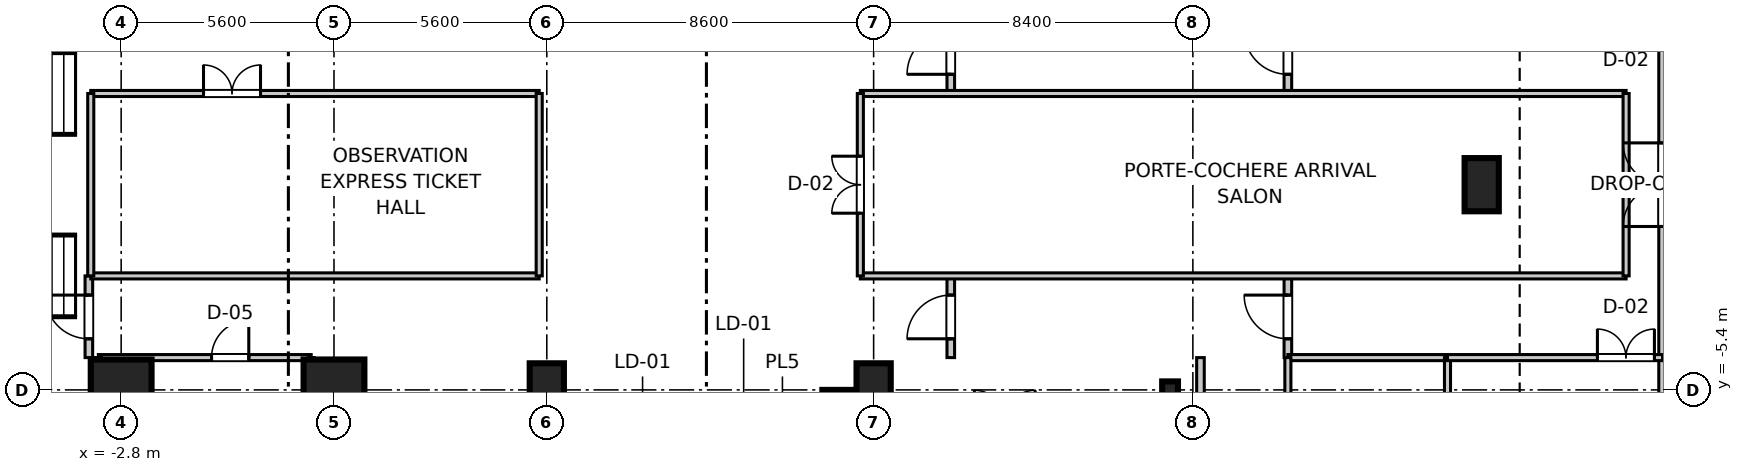
"""IFC4 building model, lengths in metres.
Left out: names, types, materials, properties, quantities, classifications, styles, units other than length and angle.
Written with IfcOpenShell. Run it as: python <this file> out.ifc"""

import sys

from ifc_helpers import new_model, si_unit, direction, frame, frame_2d, origin, origin_2d, place, context, subcontext, project, spatial, rectangle, i_section, extrude, source, transform, mapped, element, fill, save


model = new_model("IFC4")
c1 = context("Model", 3, precision=1e-05, world=origin(), true_north=direction((0.0, 1.0)))
c2 = subcontext(c1, "Body", "Model", "MODEL_VIEW")
j1 = project(units=[si_unit("LENGTHUNIT", "METRE"), si_unit("PLANEANGLEUNIT", "RADIAN")], contexts=[c1])
p1 = place(None, origin())
s1 = spatial("IfcSite", under=j1, at=p1, CompositionType="ELEMENT")
p2 = place(p1, origin())
s2 = spatial("IfcBuilding", under=s1, at=p2, CompositionType="ELEMENT")
p3 = place(p2, origin())
s3 = spatial("IfcBuildingStorey", under=s2, at=p3, CompositionType="ELEMENT", Elevation=0.0)
m1 = source(origin(), c2, "Body", "SweptSolid", [
    extrude(rectangle(XDim=1.6, YDim=1.6, at=origin_2d()), origin(), (0.0, 0.0, 1.0), 5.355),
])
for number, where, z_axis, x_axis in (
    (1, (-2.8, -5.4, 0.0), (0.0, 0.0, 1.0), (1.0, 0.0, 0.0)),
    (2, (2.8, -5.4, 0.0), (0.0, 0.0, 1.0), (1.0, 0.0, 0.0)),
):
    element("IfcColumn", number, at=place(p3, frame(where, z_axis=z_axis, x_axis=x_axis)), inside=s3, PredefinedType="COLUMN", context=c2, shape_type="MappedRepresentation", body=[
        mapped(m1, transform((0.0, 0.0, 0.0), scale=1.0)),
    ])
m2 = source(origin(), c2, "Body", "SweptSolid", [
    extrude(rectangle(XDim=0.9, YDim=1.4, at=origin_2d()), origin(), (0.0, 0.0, 1.0), 5.355),
])
for number, where, z_axis, x_axis in (
    (3, (8.4, -5.4, 0.0), (0.0, 0.0, 1.0), (1.0, 0.0, 0.0)),
    (4, (17.0, -5.4, 0.0), (0.0, 0.0, 1.0), (1.0, 0.0, 0.0)),
    (5, (33.0, 0.0, 0.0), (0.0, 0.0, 1.0), (1.0, 0.0, 0.0)),
):
    element("IfcColumn", number, at=place(p3, frame(where, z_axis=z_axis, x_axis=x_axis)), inside=s3, PredefinedType="PILASTER", context=c2, shape_type="MappedRepresentation", body=[
        mapped(m2, transform((0.0, 0.0, 0.0), scale=1.0)),
    ])
m3 = source(origin(), c2, "Body", "SweptSolid", [
    extrude(i_section(OverallWidth=0.416, OverallDepth=0.446, WebThickness=0.025, FlangeThickness=0.04, at=origin_2d()), origin(), (0.0, 0.0, 1.0), 5.355),
])
p4 = place(p3, frame((24.8, -5.4, 0.0), z_axis=(0.0, 0.0, 1.0), x_axis=(1.0, 0.0, 0.0)))
e6 = element("IfcColumn", 6, at=p4, inside=s3, PredefinedType="COLUMN", context=c2, shape_type="MappedRepresentation", body=[
    mapped(m3, transform((0.0, 0.0, 0.0), scale=1.0)),
])
m4 = source(origin(), c2, "Body", "SweptSolid", [
    extrude(rectangle(XDim=11.6, YDim=0.8, at=frame_2d((5.8, 0.0))), origin(), (0.0, 0.0, 1.0), 5.08),
])
p5 = place(p3, frame((16.05, -17.0, 0.0), z_axis=(0.0, 0.0, 1.0), x_axis=(0.0, 1.0, 0.0)))
e7 = element("IfcWall", 7, at=p5, inside=s3, PredefinedType="SHEAR", context=c2, shape_type="MappedRepresentation", body=[
    mapped(m4, transform((0.0, 0.0, 0.0), scale=1.0)),
])
m5 = source(origin(), c2, "Body", "SweptSolid", [
    extrude(rectangle(XDim=20.0, YDim=0.32, at=frame_2d((10.0, 0.0))), origin(), (0.0, 0.0, 1.0), 5.08),
])
p6 = place(p3, frame((37.82, -10.0, 0.0), z_axis=(0.0, 0.0, 1.0), x_axis=(0.0, 1.0, 0.0)))
e8 = element("IfcWall", 8, at=p6, inside=s3, PredefinedType="STANDARD", context=c2, shape_type="MappedRepresentation", body=[
    mapped(m5, transform((0.0, 0.0, 0.0), scale=1.0)),
])
p7 = place(p6, frame((8.9, 0.0, 0.0)))
e9 = element("IfcOpeningElement", 9, at=p7, cuts=e8, PredefinedType="OPENING", context=c2, shape_type="SweptSolid", body=[
    extrude(rectangle(XDim=2.2, YDim=2.6, at=frame_2d((1.1, 1.3))), frame((0.0, 0.17, 0.0), z_axis=(0.0, -1.0, 0.0), x_axis=(1.0, 0.0, 0.0)), (0.0, 0.0, 1.0), 0.34),
])
m6 = source(origin(), c2, "Body", "SweptSolid", [
    extrude(rectangle(XDim=2.15, YDim=0.2, at=frame_2d((1.075, 0.0))), origin(), (0.0, 0.0, 1.0), 3.4),
])
p8 = place(p3, frame((-3.65, -4.55, 0.0), z_axis=(0.0, 0.0, 1.0), x_axis=(0.0, 1.0, 0.0)))
e10 = element("IfcWall", 10, at=p8, inside=s3, PredefinedType="PARTITIONING", context=c2, shape_type="MappedRepresentation", body=[
    mapped(m6, transform((0.0, 0.0, 0.0), scale=1.0)),
])
p9 = place(p8, frame((0.495, 0.0, 0.0)))
e11 = element("IfcOpeningElement", 11, at=p9, cuts=e10, PredefinedType="OPENING", context=c2, shape_type="SweptSolid", body=[
    extrude(rectangle(XDim=1.15, YDim=2.15, at=frame_2d((0.575, 1.075))), frame((0.0, 0.11, 0.0), z_axis=(0.0, -1.0, 0.0), x_axis=(1.0, 0.0, 0.0)), (0.0, 0.0, 1.0), 0.22),
])
p10 = place(p3, frame((19.03, 2.4, 0.0), z_axis=(0.0, 0.0, 1.0), x_axis=(0.0, 1.0, 0.0)))
e12 = element("IfcWall", 12, at=p10, inside=s3, PredefinedType="PARTITIONING", context=c2, shape_type="MappedRepresentation", body=[
    mapped(m6, transform((0.0, 0.0, 0.0), scale=1.0)),
])
p11 = place(p10, frame((0.505, 0.0, 0.0)))
e13 = element("IfcOpeningElement", 13, at=p11, cuts=e12, PredefinedType="OPENING", context=c2, shape_type="SweptSolid", body=[
    extrude(rectangle(XDim=1.15, YDim=2.15, at=frame_2d((0.575, 1.075))), frame((0.0, 0.11, 0.0), z_axis=(0.0, -1.0, 0.0), x_axis=(1.0, 0.0, 0.0)), (0.0, 0.0, 1.0), 0.22),
])
p12 = place(p3, frame((27.9, 2.4, 0.0), z_axis=(0.0, 0.0, 1.0), x_axis=(0.0, 1.0, 0.0)))
e14 = element("IfcWall", 14, at=p12, inside=s3, PredefinedType="PARTITIONING", context=c2, shape_type="MappedRepresentation", body=[
    mapped(m6, transform((0.0, 0.0, 0.0), scale=1.0)),
])
p13 = place(p12, frame((0.505, 0.0, 0.0)))
e15 = element("IfcOpeningElement", 15, at=p13, cuts=e14, PredefinedType="OPENING", context=c2, shape_type="SweptSolid", body=[
    extrude(rectangle(XDim=1.15, YDim=2.15, at=frame_2d((0.575, 1.075))), frame((0.0, 0.11, 0.0), z_axis=(0.0, -1.0, 0.0), x_axis=(1.0, 0.0, 0.0)), (0.0, 0.0, 1.0), 0.22),
])
p14 = place(p3, frame((19.03, -4.55, 0.0), z_axis=(0.0, 0.0, 1.0), x_axis=(0.0, 1.0, 0.0)))
e16 = element("IfcWall", 16, at=p14, inside=s3, PredefinedType="PARTITIONING", context=c2, shape_type="MappedRepresentation", body=[
    mapped(m6, transform((0.0, 0.0, 0.0), scale=1.0)),
])
p15 = place(p14, frame((0.495, 0.0, 0.0)))
e17 = element("IfcOpeningElement", 17, at=p15, cuts=e16, PredefinedType="OPENING", context=c2, shape_type="SweptSolid", body=[
    extrude(rectangle(XDim=1.15, YDim=2.15, at=frame_2d((0.575, 1.075))), frame((0.0, 0.11, 0.0), z_axis=(0.0, -1.0, 0.0), x_axis=(1.0, 0.0, 0.0)), (0.0, 0.0, 1.0), 0.22),
])
m7 = source(origin(), c2, "Body", "SweptSolid", [
    extrude(rectangle(XDim=19.21, YDim=0.2, at=frame_2d((9.605, 0.0))), origin(), (0.0, 0.0, 1.0), 3.4),
])
p16 = place(p3, frame((25.6, -23.76, 0.0), z_axis=(0.0, 0.0, 1.0), x_axis=(0.0, 1.0, 0.0)))
e18 = element("IfcWall", 18, at=p16, inside=s3, PredefinedType="PARTITIONING", context=c2, shape_type="MappedRepresentation", body=[
    mapped(m7, transform((0.0, 0.0, 0.0), scale=1.0)),
])
p17 = place(p3, frame((27.9, -4.55, 0.0), z_axis=(0.0, 0.0, 1.0), x_axis=(0.0, 1.0, 0.0)))
e19 = element("IfcWall", 19, at=p17, inside=s3, PredefinedType="PARTITIONING", context=c2, shape_type="MappedRepresentation", body=[
    mapped(m6, transform((0.0, 0.0, 0.0), scale=1.0)),
])
p18 = place(p17, frame((0.495, 0.0, 0.0)))
e20 = element("IfcOpeningElement", 20, at=p18, cuts=e19, PredefinedType="OPENING", context=c2, shape_type="SweptSolid", body=[
    extrude(rectangle(XDim=1.15, YDim=2.15, at=frame_2d((0.575, 1.075))), frame((0.0, 0.11, 0.0), z_axis=(0.0, -1.0, 0.0), x_axis=(1.0, 0.0, 0.0)), (0.0, 0.0, 1.0), 0.22),
])
m8 = source(origin(), c2, "Body", "SweptSolid", [
    extrude(rectangle(XDim=11.8, YDim=0.16, at=frame_2d((5.9, 0.0))), origin(), (0.0, 0.0, 1.0), 3.4),
])
p19 = place(p3, frame((-3.6, -2.4, 0.0), z_axis=(0.0, 0.0, 1.0), x_axis=(1.0, 0.0, 0.0)))
e21 = element("IfcWall", 21, at=p19, inside=s3, PredefinedType="PARTITIONING", context=c2, shape_type="MappedRepresentation", body=[
    mapped(m8, transform((0.0, 0.0, 0.0), scale=1.0)),
])
p20 = place(p3, frame((-3.6, 2.4, 0.0), z_axis=(0.0, 0.0, 1.0), x_axis=(1.0, 0.0, 0.0)))
e22 = element("IfcWall", 22, at=p20, inside=s3, PredefinedType="PARTITIONING", context=c2, shape_type="MappedRepresentation", body=[
    mapped(m8, transform((0.0, 0.0, 0.0), scale=1.0)),
])
p21 = place(p20, frame((2.967, 0.0, 0.0)))
e23 = element("IfcOpeningElement", 23, at=p21, cuts=e22, PredefinedType="OPENING", context=c2, shape_type="SweptSolid", body=[
    extrude(rectangle(XDim=1.5, YDim=2.15, at=frame_2d((0.75, 1.075))), frame((0.0, 0.09, 0.0), z_axis=(0.0, -1.0, 0.0), x_axis=(1.0, 0.0, 0.0)), (0.0, 0.0, 1.0), 0.18),
])
m9 = source(origin(), c2, "Body", "SweptSolid", [
    extrude(rectangle(XDim=4.8, YDim=0.16, at=frame_2d((2.4, 0.0))), origin(), (0.0, 0.0, 1.0), 3.4),
])
for number, where, z_axis, x_axis in (
    (24, (-3.6, -2.4, 0.0), (0.0, 0.0, 1.0), (0.0, 1.0, 0.0)),
    (25, (8.2, -2.4, 0.0), (0.0, 0.0, 1.0), (0.0, 1.0, 0.0)),
):
    element("IfcWall", number, at=place(p3, frame(where, z_axis=z_axis, x_axis=x_axis)), inside=s3, PredefinedType="PARTITIONING", context=c2, shape_type="MappedRepresentation", body=[
        mapped(m9, transform((0.0, 0.0, 0.0), scale=1.0)),
    ])
m10 = source(origin(), c2, "Body", "SweptSolid", [
    extrude(rectangle(XDim=20.15, YDim=0.16, at=frame_2d((10.075, 0.0))), origin(), (0.0, 0.0, 1.0), 3.4),
])
for number, where, z_axis, x_axis in (
    (26, (16.65, -2.4, 0.0), (0.0, 0.0, 1.0), (1.0, 0.0, 0.0)),
    (27, (16.65, 2.4, 0.0), (0.0, 0.0, 1.0), (1.0, 0.0, 0.0)),
):
    element("IfcWall", number, at=place(p3, frame(where, z_axis=z_axis, x_axis=x_axis)), inside=s3, PredefinedType="PARTITIONING", context=c2, shape_type="MappedRepresentation", body=[
        mapped(m10, transform((0.0, 0.0, 0.0), scale=1.0)),
    ])
p22 = place(p3, frame((16.65, -2.4, 0.0), z_axis=(0.0, 0.0, 1.0), x_axis=(0.0, 1.0, 0.0)))
e28 = element("IfcWall", 28, at=p22, inside=s3, PredefinedType="PARTITIONING", context=c2, shape_type="MappedRepresentation", body=[
    mapped(m9, transform((0.0, 0.0, 0.0), scale=1.0)),
])
p23 = place(p22, frame((1.65, 0.0, 0.0)))
e29 = element("IfcOpeningElement", 29, at=p23, cuts=e28, PredefinedType="OPENING", context=c2, shape_type="SweptSolid", body=[
    extrude(rectangle(XDim=1.5, YDim=2.15, at=frame_2d((0.75, 1.075))), frame((0.0, 0.09, 0.0), z_axis=(0.0, -1.0, 0.0), x_axis=(1.0, 0.0, 0.0)), (0.0, 0.0, 1.0), 0.18),
])
p24 = place(p3, frame((36.8, -2.4, 0.0), z_axis=(0.0, 0.0, 1.0), x_axis=(0.0, 1.0, 0.0)))
e30 = element("IfcWall", 30, at=p24, inside=s3, PredefinedType="PARTITIONING", context=c2, shape_type="MappedRepresentation", body=[
    mapped(m9, transform((0.0, 0.0, 0.0), scale=1.0)),
])
m11 = source(origin(), c2, "Body", "SweptSolid", [
    extrude(rectangle(XDim=4.2, YDim=0.16, at=frame_2d((2.1, 0.0))), origin(), (0.0, 0.0, 1.0), 3.4),
])
p25 = place(p3, frame((27.9, -4.55, 0.0), z_axis=(0.0, 0.0, 1.0), x_axis=(1.0, 0.0, 0.0)))
e31 = element("IfcWall", 31, at=p25, inside=s3, PredefinedType="PARTITIONING", context=c2, shape_type="MappedRepresentation", body=[
    mapped(m11, transform((0.0, 0.0, 0.0), scale=1.0)),
])
m12 = source(origin(), c2, "Body", "SweptSolid", [
    extrude(rectangle(XDim=19.21, YDim=0.16, at=frame_2d((9.605, 0.0))), origin(), (0.0, 0.0, 1.0), 3.4),
])
p26 = place(p3, frame((27.9, -23.76, 0.0), z_axis=(0.0, 0.0, 1.0), x_axis=(0.0, 1.0, 0.0)))
e32 = element("IfcWall", 32, at=p26, inside=s3, PredefinedType="PARTITIONING", context=c2, shape_type="MappedRepresentation", body=[
    mapped(m12, transform((0.0, 0.0, 0.0), scale=1.0)),
])
p27 = place(p26, frame((12.439, 0.0, 0.0)))
e33 = element("IfcOpeningElement", 33, at=p27, cuts=e32, PredefinedType="OPENING", context=c2, shape_type="SweptSolid", body=[
    extrude(rectangle(XDim=0.98, YDim=2.1, at=frame_2d((0.49, 1.05))), frame((0.0, 0.09, 0.0), z_axis=(0.0, -1.0, 0.0), x_axis=(1.0, 0.0, 0.0)), (0.0, 0.0, 1.0), 0.18),
])
p28 = place(p3, frame((32.1, -23.76, 0.0), z_axis=(0.0, 0.0, 1.0), x_axis=(0.0, 1.0, 0.0)))
e34 = element("IfcWall", 34, at=p28, inside=s3, PredefinedType="PARTITIONING", context=c2, shape_type="MappedRepresentation", body=[
    mapped(m12, transform((0.0, 0.0, 0.0), scale=1.0)),
])
m13 = source(origin(), c2, "Body", "SweptSolid", [
    extrude(rectangle(XDim=5.6, YDim=0.16, at=frame_2d((2.8, 0.0))), origin(), (0.0, 0.0, 1.0), 3.4),
])
p29 = place(p3, frame((-3.4, -4.55, 0.0), z_axis=(0.0, 0.0, 1.0), x_axis=(1.0, 0.0, 0.0)))
e35 = element("IfcWall", 35, at=p29, inside=s3, PredefinedType="PARTITIONING", context=c2, shape_type="MappedRepresentation", body=[
    mapped(m13, transform((0.0, 0.0, 0.0), scale=1.0)),
])
p30 = place(p29, frame((2.978, 0.0, 0.0)))
e36 = element("IfcOpeningElement", 36, at=p30, cuts=e35, PredefinedType="OPENING", context=c2, shape_type="SweptSolid", body=[
    extrude(rectangle(XDim=0.98, YDim=2.1, at=frame_2d((0.49, 1.05))), frame((0.0, 0.09, 0.0), z_axis=(0.0, -1.0, 0.0), x_axis=(1.0, 0.0, 0.0)), (0.0, 0.0, 1.0), 0.18),
])
m14 = source(origin(), c2, "Body", "SweptSolid", [
    extrude(rectangle(XDim=6.95, YDim=0.16, at=frame_2d((3.475, 0.0))), origin(), (0.0, 0.0, 1.0), 3.4),
])
for number, where, z_axis, x_axis in (
    (37, (-3.4, -11.5, 0.0), (0.0, 0.0, 1.0), (0.0, 1.0, 0.0)),
    (38, (2.2, -11.5, 0.0), (0.0, 0.0, 1.0), (0.0, 1.0, 0.0)),
):
    element("IfcWall", number, at=place(p3, frame(where, z_axis=z_axis, x_axis=x_axis)), inside=s3, PredefinedType="PARTITIONING", context=c2, shape_type="MappedRepresentation", body=[
        mapped(m14, transform((0.0, 0.0, 0.0), scale=1.0)),
    ])
m15 = source(origin(), c2, "Body", "SweptSolid", [
    extrude(rectangle(XDim=5.66, YDim=0.16, at=frame_2d((2.83, 0.0))), origin(), (0.0, 0.0, 1.0), 3.4),
])
p31 = place(p3, frame((32.1, -4.55, 0.0), z_axis=(0.0, 0.0, 1.0), x_axis=(1.0, 0.0, 0.0)))
e39 = element("IfcWall", 39, at=p31, inside=s3, PredefinedType="PARTITIONING", context=c2, shape_type="MappedRepresentation", body=[
    mapped(m15, transform((0.0, 0.0, 0.0), scale=1.0)),
])
p32 = place(p31, frame((3.945, 0.0, 0.0)))
e40 = element("IfcOpeningElement", 40, at=p32, cuts=e39, PredefinedType="OPENING", context=c2, shape_type="SweptSolid", body=[
    extrude(rectangle(XDim=1.5, YDim=2.15, at=frame_2d((0.75, 1.075))), frame((0.0, 0.09, 0.0), z_axis=(0.0, -1.0, 0.0), x_axis=(1.0, 0.0, 0.0)), (0.0, 0.0, 1.0), 0.18),
])
m16 = source(origin(), c2, "Body", "SweptSolid", [
    extrude(rectangle(XDim=2.2, YDim=2.6, at=frame_2d((1.1, 1.3))), frame((0.0, 0.025, 0.0), z_axis=(0.0, -1.0, 0.0), x_axis=(1.0, 0.0, 0.0)), (0.0, 0.0, 1.0), 0.05),
])
p33 = place(p7, frame((2.2, 0.0, 0.0), z_axis=(0.0, 0.0, 1.0), x_axis=(-1.0, 0.0, 0.0)))
e41 = element("IfcDoor", 41, at=p33, inside=s3, OperationType="DOUBLE_DOOR_SINGLE_SWING", PredefinedType="DOOR", context=c2, shape_type="MappedRepresentation", body=[
    mapped(m16, transform((0.0, 0.0, 0.0), scale=1.0)),
])
fill(e9, e41)
m17 = source(origin(), c2, "Body", "SweptSolid", [
    extrude(rectangle(XDim=1.15, YDim=2.15, at=frame_2d((0.575, 1.075))), frame((0.0, 0.025, 0.0), z_axis=(0.0, -1.0, 0.0), x_axis=(1.0, 0.0, 0.0)), (0.0, 0.0, 1.0), 0.05),
])
p34 = place(p9, origin())
e42 = element("IfcDoor", 42, at=p34, inside=s3, OperationType="SINGLE_SWING_RIGHT", PredefinedType="DOOR", context=c2, shape_type="MappedRepresentation", body=[
    mapped(m17, transform((0.0, 0.0, 0.0), scale=1.0)),
])
fill(e11, e42)
p35 = place(p11, frame((1.15, 0.0, 0.0), z_axis=(0.0, 0.0, 1.0), x_axis=(-1.0, 0.0, 0.0)))
e43 = element("IfcDoor", 43, at=p35, inside=s3, OperationType="SINGLE_SWING_LEFT", PredefinedType="DOOR", context=c2, shape_type="MappedRepresentation", body=[
    mapped(m17, transform((0.0, 0.0, 0.0), scale=1.0)),
])
fill(e13, e43)
p36 = place(p13, origin())
e44 = element("IfcDoor", 44, at=p36, inside=s3, OperationType="SINGLE_SWING_RIGHT", PredefinedType="DOOR", context=c2, shape_type="MappedRepresentation", body=[
    mapped(m17, transform((0.0, 0.0, 0.0), scale=1.0)),
])
fill(e15, e44)
p37 = place(p15, frame((1.15, 0.0, 0.0), z_axis=(0.0, 0.0, 1.0), x_axis=(-1.0, 0.0, 0.0)))
e45 = element("IfcDoor", 45, at=p37, inside=s3, OperationType="SINGLE_SWING_LEFT", PredefinedType="DOOR", context=c2, shape_type="MappedRepresentation", body=[
    mapped(m17, transform((0.0, 0.0, 0.0), scale=1.0)),
])
fill(e17, e45)
p38 = place(p18, origin())
e46 = element("IfcDoor", 46, at=p38, inside=s3, OperationType="SINGLE_SWING_RIGHT", PredefinedType="DOOR", context=c2, shape_type="MappedRepresentation", body=[
    mapped(m17, transform((0.0, 0.0, 0.0), scale=1.0)),
])
fill(e20, e46)
m18 = source(origin(), c2, "Body", "SweptSolid", [
    extrude(rectangle(XDim=1.5, YDim=2.15, at=frame_2d((0.75, 1.075))), frame((0.0, 0.025, 0.0), z_axis=(0.0, -1.0, 0.0), x_axis=(1.0, 0.0, 0.0)), (0.0, 0.0, 1.0), 0.05),
])
p39 = place(p21, frame((1.5, 0.0, 0.0), z_axis=(0.0, 0.0, 1.0), x_axis=(-1.0, 0.0, 0.0)))
e47 = element("IfcDoor", 47, at=p39, inside=s3, OperationType="DOUBLE_DOOR_SINGLE_SWING", PredefinedType="DOOR", context=c2, shape_type="MappedRepresentation", body=[
    mapped(m18, transform((0.0, 0.0, 0.0), scale=1.0)),
])
fill(e23, e47)
p40 = place(p23, frame((1.5, 0.0, 0.0), z_axis=(0.0, 0.0, 1.0), x_axis=(-1.0, 0.0, 0.0)))
e48 = element("IfcDoor", 48, at=p40, inside=s3, OperationType="DOUBLE_DOOR_SINGLE_SWING", PredefinedType="DOOR", context=c2, shape_type="MappedRepresentation", body=[
    mapped(m18, transform((0.0, 0.0, 0.0), scale=1.0)),
])
fill(e29, e48)
m19 = source(origin(), c2, "Body", "SweptSolid", [
    extrude(rectangle(XDim=0.98, YDim=2.1, at=frame_2d((0.49, 1.05))), frame((0.0, 0.025, 0.0), z_axis=(0.0, -1.0, 0.0), x_axis=(1.0, 0.0, 0.0)), (0.0, 0.0, 1.0), 0.05),
])
p41 = place(p30, frame((0.98, 0.0, 0.0), z_axis=(0.0, 0.0, 1.0), x_axis=(-1.0, 0.0, 0.0)))
e49 = element("IfcDoor", 49, at=p41, inside=s3, OperationType="SINGLE_SWING_RIGHT", PredefinedType="DOOR", context=c2, shape_type="MappedRepresentation", body=[
    mapped(m19, transform((0.0, 0.0, 0.0), scale=1.0)),
])
fill(e36, e49)
p42 = place(p32, frame((1.5, 0.0, 0.0), z_axis=(0.0, 0.0, 1.0), x_axis=(-1.0, 0.0, 0.0)))
e50 = element("IfcDoor", 50, at=p42, inside=s3, OperationType="DOUBLE_DOOR_SINGLE_SWING", PredefinedType="DOOR", context=c2, shape_type="MappedRepresentation", body=[
    mapped(m18, transform((0.0, 0.0, 0.0), scale=1.0)),
])
fill(e40, e50)
save(model, sys.argv[1])
